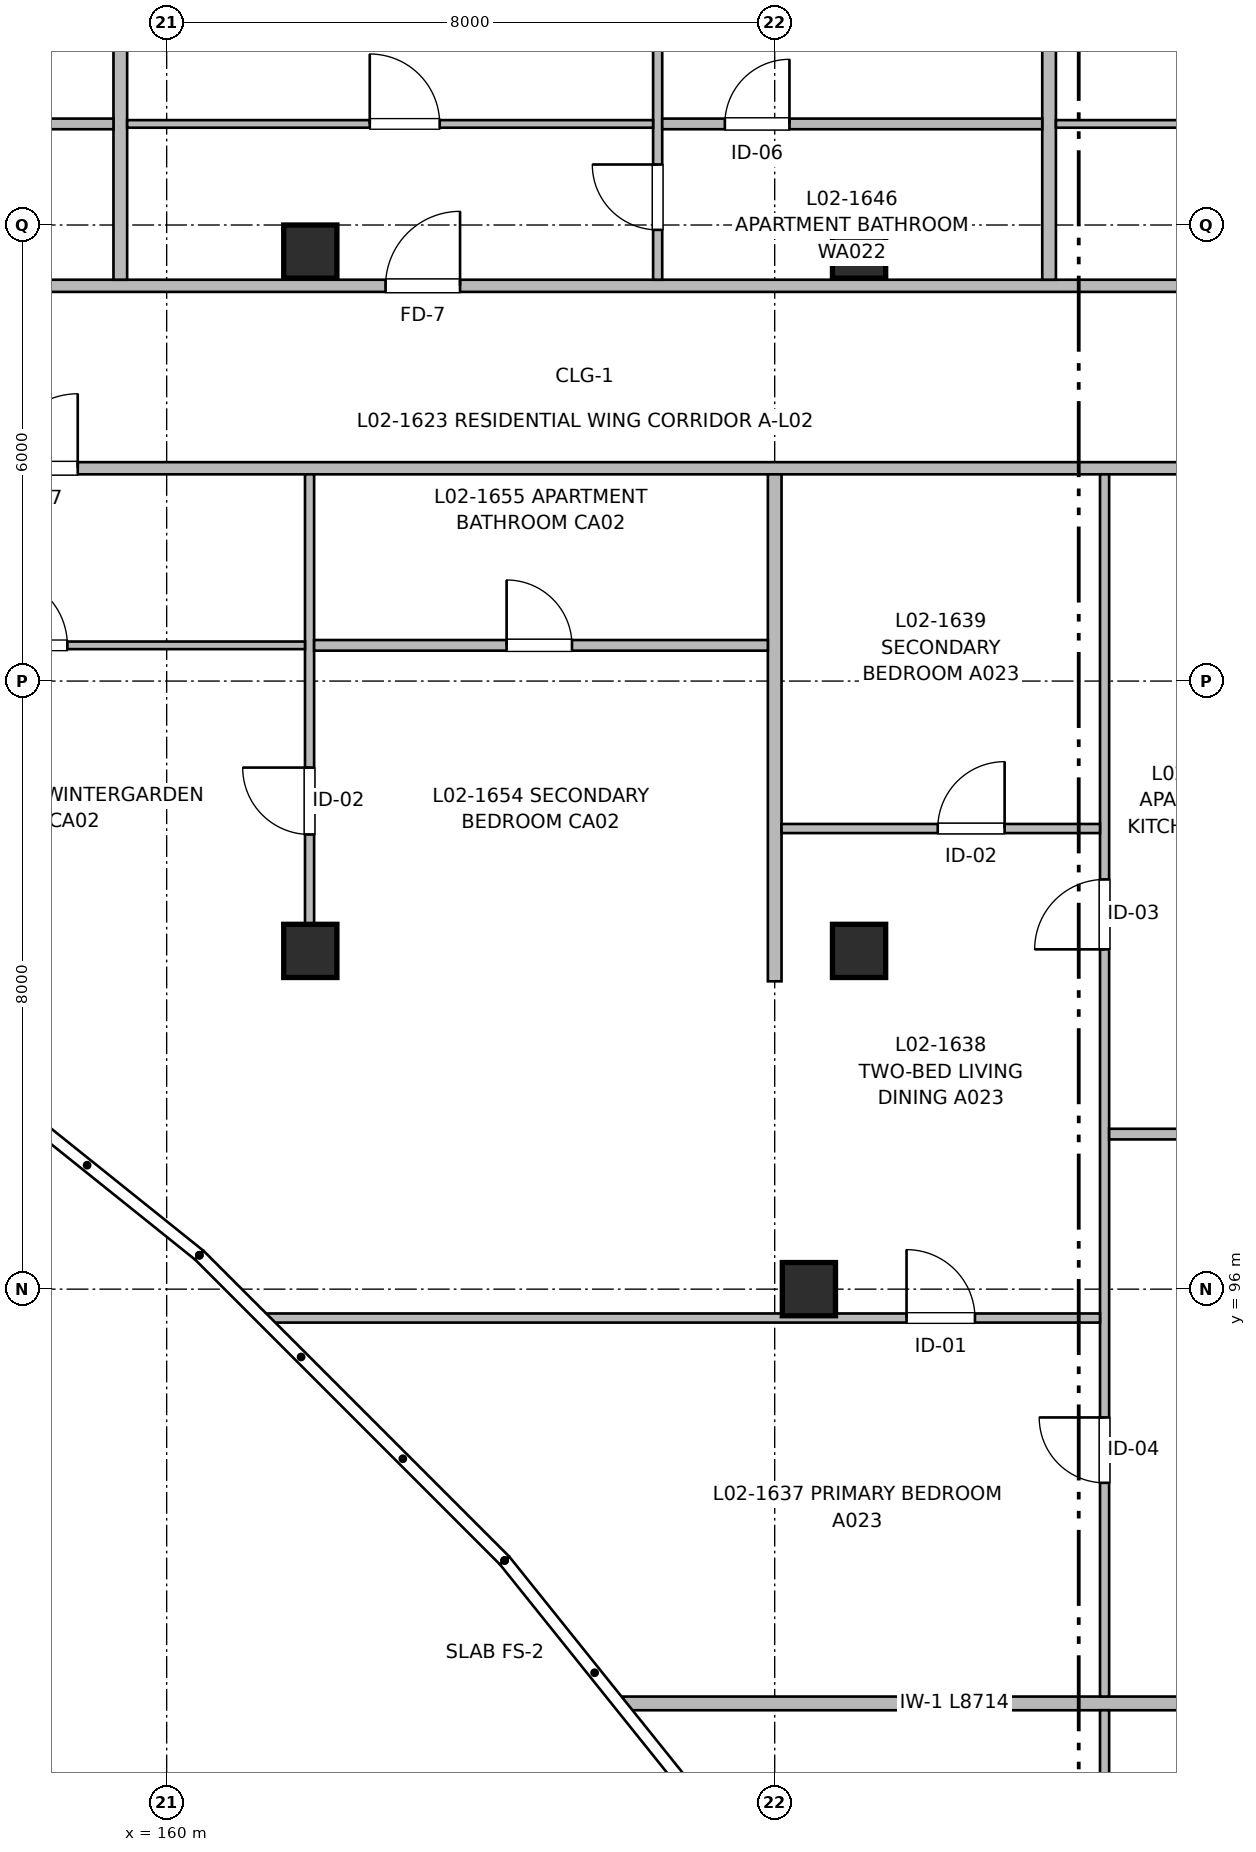
"""IFC4 building model, lengths in metres.
Left out: names, types, materials, properties, quantities, classifications, styles, units other than length and angle.
Written with IfcOpenShell. Run it as: python <this file> out.ifc"""

import sys

from ifc_helpers import new_model, si_unit, direction, frame, frame_2d, origin, origin_2d, place, context, subcontext, project, spatial, rectangle, extrude, element, fill, save


model = new_model("IFC4")
c1 = context("Model", 3, precision=1e-05, world=origin(), true_north=direction((0.0, 1.0)))
c2 = subcontext(c1, "Body", "Model", "MODEL_VIEW")
j1 = project(units=[si_unit("LENGTHUNIT", "METRE"), si_unit("PLANEANGLEUNIT", "RADIAN")], contexts=[c1])
p1 = place(None, origin())
s1 = spatial("IfcSite", under=j1, at=p1, CompositionType="ELEMENT")
p2 = place(p1, origin())
s2 = spatial("IfcBuilding", under=s1, at=p2, CompositionType="ELEMENT")
p3 = place(p2, frame((0.0, 0.0, 7.36)))
s3 = spatial("IfcBuildingStorey", under=s2, at=p3, CompositionType="ELEMENT", Elevation=7.36)
for number, where, z_axis, x_axis in (
    (1, (161.89, 100.45, 0.0), (0.0, 0.0, 1.0), (1.0, 0.0, 0.0)),
    (2, (161.89, 109.65, 0.0), (0.0, 0.0, 1.0), (1.0, 0.0, 0.0)),
    (3, (168.45, 96.0, 0.0), (0.0, 0.0, 1.0), (1.0, 0.0, 0.0)),
    (4, (169.11, 100.45, 0.0), (0.0, 0.0, 1.0), (1.0, 0.0, 0.0)),
    (5, (169.11, 109.65, 0.0), (0.0, 0.0, 1.0), (1.0, 0.0, 0.0)),
):
    element("IfcColumn", number, at=place(p3, frame(where, z_axis=z_axis, x_axis=x_axis)), inside=s3, PredefinedType="COLUMN", context=c2, shape_type="SweptSolid", body=[
        extrude(rectangle(XDim=0.7, YDim=0.7, at=origin_2d()), origin(), (0.0, 0.0, 1.0), 3.2),
    ])
p4 = place(p3, frame((147.18, 106.8, 0.0), z_axis=(0.0, 0.0, 1.0), x_axis=(1.0, 0.0, 0.0)))
e6 = element("IfcWall", 6, at=p4, inside=s3, PredefinedType="PARTITIONING", context=c2, shape_type="SweptSolid", body=[
    extrude(rectangle(XDim=27.62, YDim=0.16, at=frame_2d((13.81, 0.0))), origin(), (0.0, 0.0, 1.0), 2.935),
])
p5 = place(p4, frame((3.495, 0.0, 0.0)))
e7 = element("IfcOpeningElement", 7, at=p5, cuts=e6, PredefinedType="OPENING", context=c2, shape_type="SweptSolid", body=[
    extrude(rectangle(XDim=1.05, YDim=2.15, at=frame_2d((0.525, 1.075))), frame((0.0, 0.09, 0.0), z_axis=(0.0, -1.0, 0.0), x_axis=(1.0, 0.0, 0.0)), (0.0, 0.0, 1.0), 0.18),
])
p6 = place(p4, frame((10.67, 0.0, 0.0)))
e8 = element("IfcOpeningElement", 8, at=p6, cuts=e6, PredefinedType="OPENING", context=c2, shape_type="SweptSolid", body=[
    extrude(rectangle(XDim=0.98, YDim=2.15, at=frame_2d((0.49, 1.075))), frame((0.0, 0.09, 0.0), z_axis=(0.0, -1.0, 0.0), x_axis=(1.0, 0.0, 0.0)), (0.0, 0.0, 1.0), 0.18),
])
p7 = place(p3, frame((147.18, 109.2, 0.0), z_axis=(0.0, 0.0, 1.0), x_axis=(1.0, 0.0, 0.0)))
e9 = element("IfcWall", 9, at=p7, inside=s3, PredefinedType="PARTITIONING", context=c2, shape_type="SweptSolid", body=[
    extrude(rectangle(XDim=36.64, YDim=0.16, at=frame_2d((18.32, 0.0))), origin(), (0.0, 0.0, 1.0), 2.935),
])
p8 = place(p7, frame((3.025, 0.0, 0.0)))
e10 = element("IfcOpeningElement", 10, at=p8, cuts=e9, PredefinedType="OPENING", context=c2, shape_type="SweptSolid", body=[
    extrude(rectangle(XDim=0.98, YDim=2.15, at=frame_2d((0.49, 1.075))), frame((0.0, 0.09, 0.0), z_axis=(0.0, -1.0, 0.0), x_axis=(1.0, 0.0, 0.0)), (0.0, 0.0, 1.0), 0.18),
])
p9 = place(p7, frame((15.7, 0.0, 0.0)))
e11 = element("IfcOpeningElement", 11, at=p9, cuts=e9, PredefinedType="OPENING", context=c2, shape_type="SweptSolid", body=[
    extrude(rectangle(XDim=0.98, YDim=2.15, at=frame_2d((0.49, 1.075))), frame((0.0, 0.09, 0.0), z_axis=(0.0, -1.0, 0.0), x_axis=(1.0, 0.0, 0.0)), (0.0, 0.0, 1.0), 0.18),
])
p10 = place(p7, frame((27.145, 0.0, 0.0)))
e12 = element("IfcOpeningElement", 12, at=p10, cuts=e9, PredefinedType="OPENING", context=c2, shape_type="SweptSolid", body=[
    extrude(rectangle(XDim=0.98, YDim=2.15, at=frame_2d((0.49, 1.075))), frame((0.0, 0.09, 0.0), z_axis=(0.0, -1.0, 0.0), x_axis=(1.0, 0.0, 0.0)), (0.0, 0.0, 1.0), 0.18),
])
p11 = place(p3, frame((168.0, 100.05, 0.0), z_axis=(0.0, 0.0, 1.0), x_axis=(0.0, 1.0, 0.0)))
e13 = element("IfcWall", 13, at=p11, inside=s3, PredefinedType="PARTITIONING", context=c2, shape_type="SweptSolid", body=[
    extrude(rectangle(XDim=6.67, YDim=0.18, at=frame_2d((3.335, 0.0))), origin(), (0.0, 0.0, 1.0), 2.935),
])
p12 = place(p3, frame((166.006, 90.55, 0.0), z_axis=(0.0, 0.0, 1.0), x_axis=(1.0, 0.0, 0.0)))
e14 = element("IfcWall", 14, at=p12, inside=s3, PredefinedType="PARTITIONING", context=c2, shape_type="SweptSolid", body=[
    extrude(rectangle(XDim=8.714, YDim=0.18, at=frame_2d((4.357, 0.0))), origin(), (0.0, 0.0, 1.0), 2.935),
])
p13 = place(p3, frame((172.34, 73.45, 0.0), z_axis=(0.0, 0.0, 1.0), x_axis=(0.0, 1.0, 0.0)))
e15 = element("IfcWall", 15, at=p13, inside=s3, PredefinedType="PARTITIONING", context=c2, shape_type="SweptSolid", body=[
    extrude(rectangle(XDim=17.01, YDim=0.12, at=frame_2d((8.505, 0.0))), origin(), (0.0, 0.0, 1.0), 2.935),
])
p14 = place(p13, frame((2.972, 0.0, 0.0)))
e16 = element("IfcOpeningElement", 16, at=p14, cuts=e15, PredefinedType="OPENING", context=c2, shape_type="SweptSolid", body=[
    extrude(rectangle(XDim=0.86, YDim=2.1, at=frame_2d((0.43, 1.05))), frame((0.0, 0.07, 0.0), z_axis=(0.0, -1.0, 0.0), x_axis=(1.0, 0.0, 0.0)), (0.0, 0.0, 1.0), 0.14),
])
p15 = place(p13, frame((10.393, 0.0, 0.0)))
e17 = element("IfcOpeningElement", 17, at=p15, cuts=e15, PredefinedType="OPENING", context=c2, shape_type="SweptSolid", body=[
    extrude(rectangle(XDim=0.92, YDim=2.1, at=frame_2d((0.46, 1.05))), frame((0.0, 0.07, 0.0), z_axis=(0.0, -1.0, 0.0), x_axis=(1.0, 0.0, 0.0)), (0.0, 0.0, 1.0), 0.14),
])
p16 = place(p3, frame((172.34, 90.64, 0.0), z_axis=(0.0, 0.0, 1.0), x_axis=(0.0, 1.0, 0.0)))
e18 = element("IfcWall", 18, at=p16, inside=s3, PredefinedType="PARTITIONING", context=c2, shape_type="SweptSolid", body=[
    extrude(rectangle(XDim=16.08, YDim=0.12, at=frame_2d((8.04, 0.0))), origin(), (0.0, 0.0, 1.0), 2.935),
])
p17 = place(p16, frame((2.812, 0.0, 0.0)))
e19 = element("IfcOpeningElement", 19, at=p17, cuts=e18, PredefinedType="OPENING", context=c2, shape_type="SweptSolid", body=[
    extrude(rectangle(XDim=0.86, YDim=2.1, at=frame_2d((0.43, 1.05))), frame((0.0, 0.07, 0.0), z_axis=(0.0, -1.0, 0.0), x_axis=(1.0, 0.0, 0.0)), (0.0, 0.0, 1.0), 0.14),
])
p18 = place(p16, frame((9.83, 0.0, 0.0)))
e20 = element("IfcOpeningElement", 20, at=p18, cuts=e18, PredefinedType="OPENING", context=c2, shape_type="SweptSolid", body=[
    extrude(rectangle(XDim=0.92, YDim=2.1, at=frame_2d((0.46, 1.05))), frame((0.0, 0.07, 0.0), z_axis=(0.0, -1.0, 0.0), x_axis=(1.0, 0.0, 0.0)), (0.0, 0.0, 1.0), 0.14),
])
p19 = place(p3, frame((172.4, 98.04, 0.0), z_axis=(0.0, 0.0, 1.0), x_axis=(1.0, 0.0, 0.0)))
e21 = element("IfcWall", 21, at=p19, inside=s3, PredefinedType="PARTITIONING", context=c2, shape_type="SweptSolid", body=[
    extrude(rectangle(XDim=2.32, YDim=0.14, at=frame_2d((1.16, 0.0))), origin(), (0.0, 0.0, 1.0), 2.935),
])
p20 = place(p3, frame((161.312, 95.62, 0.0), z_axis=(0.0, 0.0, 1.0), x_axis=(1.0, 0.0, 0.0)))
e22 = element("IfcWall", 22, at=p20, inside=s3, PredefinedType="PARTITIONING", context=c2, shape_type="SweptSolid", body=[
    extrude(rectangle(XDim=10.968, YDim=0.12, at=frame_2d((5.484, 0.0))), origin(), (0.0, 0.0, 1.0), 2.935),
])
p21 = place(p20, frame((8.422, 0.0, 0.0)))
e23 = element("IfcOpeningElement", 23, at=p21, cuts=e22, PredefinedType="OPENING", context=c2, shape_type="SweptSolid", body=[
    extrude(rectangle(XDim=0.9, YDim=2.1, at=frame_2d((0.45, 1.05))), frame((0.0, 0.07, 0.0), z_axis=(0.0, -1.0, 0.0), x_axis=(1.0, 0.0, 0.0)), (0.0, 0.0, 1.0), 0.14),
])
p22 = place(p3, frame((168.09, 102.06, 0.0), z_axis=(0.0, 0.0, 1.0), x_axis=(1.0, 0.0, 0.0)))
e24 = element("IfcWall", 24, at=p22, inside=s3, PredefinedType="PARTITIONING", context=c2, shape_type="SweptSolid", body=[
    extrude(rectangle(XDim=4.19, YDim=0.12, at=frame_2d((2.095, 0.0))), origin(), (0.0, 0.0, 1.0), 2.935),
])
p23 = place(p22, frame((2.055, 0.0, 0.0)))
e25 = element("IfcOpeningElement", 25, at=p23, cuts=e24, PredefinedType="OPENING", context=c2, shape_type="SweptSolid", body=[
    extrude(rectangle(XDim=0.88, YDim=2.1, at=frame_2d((0.44, 1.05))), frame((0.0, 0.07, 0.0), z_axis=(0.0, -1.0, 0.0), x_axis=(1.0, 0.0, 0.0)), (0.0, 0.0, 1.0), 0.14),
])
for number, where, z_axis, x_axis in (
    (26, (159.39, 109.28, 0.0), (0.0, 0.0, 1.0), (0.0, 1.0, 0.0)),
    (27, (171.61, 109.28, 0.0), (0.0, 0.0, 1.0), (0.0, 1.0, 0.0)),
):
    element("IfcWall", number, at=place(p3, frame(where, z_axis=z_axis, x_axis=x_axis)), inside=s3, PredefinedType="PARTITIONING", context=c2, shape_type="SweptSolid", body=[
        extrude(rectangle(XDim=6.6, YDim=0.18, at=frame_2d((3.3, 0.0))), origin(), (0.0, 0.0, 1.0), 2.935),
    ])
p24 = place(p3, frame((154.27, 111.33, 0.0), z_axis=(0.0, 0.0, 1.0), x_axis=(1.0, 0.0, 0.0)))
e28 = element("IfcWall", 28, at=p24, inside=s3, PredefinedType="PARTITIONING", context=c2, shape_type="SweptSolid", body=[
    extrude(rectangle(XDim=5.03, YDim=0.14, at=frame_2d((2.515, 0.0))), origin(), (0.0, 0.0, 1.0), 2.935),
])
p25 = place(p24, frame((2.036, 0.0, 0.0)))
e29 = element("IfcOpeningElement", 29, at=p25, cuts=e28, PredefinedType="OPENING", context=c2, shape_type="SweptSolid", body=[
    extrude(rectangle(XDim=0.85, YDim=2.05, at=frame_2d((0.425, 1.025))), frame((0.0, 0.08, 0.0), z_axis=(0.0, -1.0, 0.0), x_axis=(1.0, 0.0, 0.0)), (0.0, 0.0, 1.0), 0.16),
])
p26 = place(p3, frame((166.46, 109.28, 0.0), z_axis=(0.0, 0.0, 1.0), x_axis=(0.0, 1.0, 0.0)))
e30 = element("IfcWall", 30, at=p26, inside=s3, PredefinedType="PARTITIONING", context=c2, shape_type="SweptSolid", body=[
    extrude(rectangle(XDim=6.6, YDim=0.12, at=frame_2d((3.3, 0.0))), origin(), (0.0, 0.0, 1.0), 2.935),
])
p27 = place(p26, frame((0.656, 0.0, 0.0)))
e31 = element("IfcOpeningElement", 31, at=p27, cuts=e30, PredefinedType="OPENING", context=c2, shape_type="SweptSolid", body=[
    extrude(rectangle(XDim=0.86, YDim=2.1, at=frame_2d((0.43, 1.05))), frame((0.0, 0.07, 0.0), z_axis=(0.0, -1.0, 0.0), x_axis=(1.0, 0.0, 0.0)), (0.0, 0.0, 1.0), 0.14),
])
p28 = place(p26, frame((4.097, 0.0, 0.0)))
e32 = element("IfcOpeningElement", 32, at=p28, cuts=e30, PredefinedType="OPENING", context=c2, shape_type="SweptSolid", body=[
    extrude(rectangle(XDim=0.9, YDim=2.1, at=frame_2d((0.45, 1.05))), frame((0.0, 0.07, 0.0), z_axis=(0.0, -1.0, 0.0), x_axis=(1.0, 0.0, 0.0)), (0.0, 0.0, 1.0), 0.14),
])
p29 = place(p3, frame((166.52, 111.33, 0.0), z_axis=(0.0, 0.0, 1.0), x_axis=(1.0, 0.0, 0.0)))
e33 = element("IfcWall", 33, at=p29, inside=s3, PredefinedType="PARTITIONING", context=c2, shape_type="SweptSolid", body=[
    extrude(rectangle(XDim=5.0, YDim=0.14, at=frame_2d((2.5, 0.0))), origin(), (0.0, 0.0, 1.0), 2.935),
])
p30 = place(p29, frame((0.824, 0.0, 0.0)))
e34 = element("IfcOpeningElement", 34, at=p30, cuts=e33, PredefinedType="OPENING", context=c2, shape_type="SweptSolid", body=[
    extrude(rectangle(XDim=0.85, YDim=2.05, at=frame_2d((0.425, 1.025))), frame((0.0, 0.08, 0.0), z_axis=(0.0, -1.0, 0.0), x_axis=(1.0, 0.0, 0.0)), (0.0, 0.0, 1.0), 0.16),
])
p31 = place(p3, frame((159.48, 111.33, 0.0), z_axis=(0.0, 0.0, 1.0), x_axis=(1.0, 0.0, 0.0)))
e35 = element("IfcWall", 35, at=p31, inside=s3, PredefinedType="PARTITIONING", context=c2, shape_type="SweptSolid", body=[
    extrude(rectangle(XDim=6.92, YDim=0.1, at=frame_2d((3.46, 0.0))), origin(), (0.0, 0.0, 1.0), 2.935),
])
p32 = place(p31, frame((3.192, 0.0, 0.0)))
e36 = element("IfcOpeningElement", 36, at=p32, cuts=e35, PredefinedType="OPENING", context=c2, shape_type="SweptSolid", body=[
    extrude(rectangle(XDim=0.92, YDim=2.1, at=frame_2d((0.46, 1.05))), frame((0.0, 0.06, 0.0), z_axis=(0.0, -1.0, 0.0), x_axis=(1.0, 0.0, 0.0)), (0.0, 0.0, 1.0), 0.12),
])
p33 = place(p3, frame((171.7, 111.33, 0.0), z_axis=(0.0, 0.0, 1.0), x_axis=(1.0, 0.0, 0.0)))
e37 = element("IfcWall", 37, at=p33, inside=s3, PredefinedType="PARTITIONING", context=c2, shape_type="SweptSolid", body=[
    extrude(rectangle(XDim=6.97, YDim=0.1, at=frame_2d((3.485, 0.0))), origin(), (0.0, 0.0, 1.0), 2.935),
])
p34 = place(p33, frame((2.812, 0.0, 0.0)))
e38 = element("IfcOpeningElement", 38, at=p34, cuts=e37, PredefinedType="OPENING", context=c2, shape_type="SweptSolid", body=[
    extrude(rectangle(XDim=0.92, YDim=2.1, at=frame_2d((0.46, 1.05))), frame((0.0, 0.06, 0.0), z_axis=(0.0, -1.0, 0.0), x_axis=(1.0, 0.0, 0.0)), (0.0, 0.0, 1.0), 0.12),
])
p35 = place(p3, frame((161.88, 100.18, 0.0), z_axis=(0.0, 0.0, 1.0), x_axis=(0.0, 1.0, 0.0)))
e39 = element("IfcWall", 39, at=p35, inside=s3, PredefinedType="PARTITIONING", context=c2, shape_type="SweptSolid", body=[
    extrude(rectangle(XDim=6.54, YDim=0.12, at=frame_2d((3.27, 0.0))), origin(), (0.0, 0.0, 1.0), 2.68),
])
p36 = place(p35, frame((1.802, 0.0, 0.0)))
e40 = element("IfcOpeningElement", 40, at=p36, cuts=e39, PredefinedType="OPENING", context=c2, shape_type="SweptSolid", body=[
    extrude(rectangle(XDim=0.88, YDim=2.1, at=frame_2d((0.44, 1.05))), frame((0.0, 0.07, 0.0), z_axis=(0.0, -1.0, 0.0), x_axis=(1.0, 0.0, 0.0)), (0.0, 0.0, 1.0), 0.14),
])
p37 = place(p3, frame((161.94, 104.47, 0.0), z_axis=(0.0, 0.0, 1.0), x_axis=(1.0, 0.0, 0.0)))
e41 = element("IfcWall", 41, at=p37, inside=s3, PredefinedType="PARTITIONING", context=c2, shape_type="SweptSolid", body=[
    extrude(rectangle(XDim=5.97, YDim=0.14, at=frame_2d((2.985, 0.0))), origin(), (0.0, 0.0, 1.0), 2.935),
])
p38 = place(p37, frame((2.533, 0.0, 0.0)))
e42 = element("IfcOpeningElement", 42, at=p38, cuts=e41, PredefinedType="OPENING", context=c2, shape_type="SweptSolid", body=[
    extrude(rectangle(XDim=0.86, YDim=2.1, at=frame_2d((0.43, 1.05))), frame((0.0, 0.08, 0.0), z_axis=(0.0, -1.0, 0.0), x_axis=(1.0, 0.0, 0.0)), (0.0, 0.0, 1.0), 0.16),
])
p39 = place(p3, frame((154.8, 104.47, 0.0), z_axis=(0.0, 0.0, 1.0), x_axis=(1.0, 0.0, 0.0)))
e43 = element("IfcWall", 43, at=p39, inside=s3, PredefinedType="PARTITIONING", context=c2, shape_type="SweptSolid", body=[
    extrude(rectangle(XDim=7.02, YDim=0.1, at=frame_2d((3.51, 0.0))), origin(), (0.0, 0.0, 1.0), 2.935),
])
p40 = place(p39, frame((2.974, 0.0, 0.0)))
e44 = element("IfcOpeningElement", 44, at=p40, cuts=e43, PredefinedType="OPENING", context=c2, shape_type="SweptSolid", body=[
    extrude(rectangle(XDim=0.92, YDim=2.1, at=frame_2d((0.46, 1.05))), frame((0.0, 0.06, 0.0), z_axis=(0.0, -1.0, 0.0), x_axis=(1.0, 0.0, 0.0)), (0.0, 0.0, 1.0), 0.12),
])
p41 = place(p17, origin())
e45 = element("IfcDoor", 45, at=p41, inside=s3, OperationType="SINGLE_SWING_RIGHT", PredefinedType="DOOR", context=c2, shape_type="SweptSolid", body=[
    extrude(rectangle(XDim=0.86, YDim=2.1, at=frame_2d((0.43, 1.05))), frame((0.0, 0.025, 0.0), z_axis=(0.0, -1.0, 0.0), x_axis=(1.0, 0.0, 0.0)), (0.0, 0.0, 1.0), 0.05),
])
fill(e19, e45)
p42 = place(p18, origin())
e46 = element("IfcDoor", 46, at=p42, inside=s3, OperationType="SINGLE_SWING_LEFT", PredefinedType="DOOR", context=c2, shape_type="SweptSolid", body=[
    extrude(rectangle(XDim=0.92, YDim=2.1, at=frame_2d((0.46, 1.05))), frame((0.0, 0.025, 0.0), z_axis=(0.0, -1.0, 0.0), x_axis=(1.0, 0.0, 0.0)), (0.0, 0.0, 1.0), 0.05),
])
fill(e20, e46)
p43 = place(p21, origin())
e47 = element("IfcDoor", 47, at=p43, inside=s3, OperationType="SINGLE_SWING_LEFT", PredefinedType="DOOR", context=c2, shape_type="SweptSolid", body=[
    extrude(rectangle(XDim=0.9, YDim=2.1, at=frame_2d((0.45, 1.05))), frame((0.0, 0.025, 0.0), z_axis=(0.0, -1.0, 0.0), x_axis=(1.0, 0.0, 0.0)), (0.0, 0.0, 1.0), 0.05),
])
fill(e23, e47)
p44 = place(p23, origin())
e48 = element("IfcDoor", 48, at=p44, inside=s3, OperationType="SINGLE_SWING_RIGHT", PredefinedType="DOOR", context=c2, shape_type="SweptSolid", body=[
    extrude(rectangle(XDim=0.88, YDim=2.1, at=frame_2d((0.44, 1.05))), frame((0.0, 0.025, 0.0), z_axis=(0.0, -1.0, 0.0), x_axis=(1.0, 0.0, 0.0)), (0.0, 0.0, 1.0), 0.05),
])
fill(e25, e48)
p45 = place(p9, origin())
e49 = element("IfcDoor", 49, at=p45, inside=s3, OperationType="SINGLE_SWING_RIGHT", PredefinedType="DOOR", context=c2, shape_type="SweptSolid", body=[
    extrude(rectangle(XDim=0.98, YDim=2.15, at=frame_2d((0.49, 1.075))), frame((0.0, 0.025, 0.0), z_axis=(0.0, -1.0, 0.0), x_axis=(1.0, 0.0, 0.0)), (0.0, 0.0, 1.0), 0.05),
])
fill(e11, e49)
p46 = place(p32, origin())
e50 = element("IfcDoor", 50, at=p46, inside=s3, OperationType="SINGLE_SWING_LEFT", PredefinedType="DOOR", context=c2, shape_type="SweptSolid", body=[
    extrude(rectangle(XDim=0.92, YDim=2.1, at=frame_2d((0.46, 1.05))), frame((0.0, 0.025, 0.0), z_axis=(0.0, -1.0, 0.0), x_axis=(1.0, 0.0, 0.0)), (0.0, 0.0, 1.0), 0.05),
])
fill(e36, e50)
p47 = place(p27, origin())
e51 = element("IfcDoor", 51, at=p47, inside=s3, OperationType="SINGLE_SWING_RIGHT", PredefinedType="DOOR", context=c2, shape_type="SweptSolid", body=[
    extrude(rectangle(XDim=0.86, YDim=2.1, at=frame_2d((0.43, 1.05))), frame((0.0, 0.025, 0.0), z_axis=(0.0, -1.0, 0.0), x_axis=(1.0, 0.0, 0.0)), (0.0, 0.0, 1.0), 0.05),
])
fill(e31, e51)
p48 = place(p30, origin())
e52 = element("IfcDoor", 52, at=p48, inside=s3, OperationType="SINGLE_SWING_RIGHT", PredefinedType="DOOR", context=c2, shape_type="SweptSolid", body=[
    extrude(rectangle(XDim=0.85, YDim=2.05, at=frame_2d((0.425, 1.025))), frame((0.0, 0.025, 0.0), z_axis=(0.0, -1.0, 0.0), x_axis=(1.0, 0.0, 0.0)), (0.0, 0.0, 1.0), 0.05),
])
fill(e34, e52)
p49 = place(p6, origin())
e53 = element("IfcDoor", 53, at=p49, inside=s3, OperationType="SINGLE_SWING_RIGHT", PredefinedType="DOOR", context=c2, shape_type="SweptSolid", body=[
    extrude(rectangle(XDim=0.98, YDim=2.15, at=frame_2d((0.49, 1.075))), frame((0.0, 0.025, 0.0), z_axis=(0.0, -1.0, 0.0), x_axis=(1.0, 0.0, 0.0)), (0.0, 0.0, 1.0), 0.05),
])
fill(e8, e53)
p50 = place(p40, origin())
e54 = element("IfcDoor", 54, at=p50, inside=s3, OperationType="SINGLE_SWING_LEFT", PredefinedType="DOOR", context=c2, shape_type="SweptSolid", body=[
    extrude(rectangle(XDim=0.92, YDim=2.1, at=frame_2d((0.46, 1.05))), frame((0.0, 0.025, 0.0), z_axis=(0.0, -1.0, 0.0), x_axis=(1.0, 0.0, 0.0)), (0.0, 0.0, 1.0), 0.05),
])
fill(e44, e54)
p51 = place(p36, origin())
e55 = element("IfcDoor", 55, at=p51, inside=s3, OperationType="SINGLE_SWING_RIGHT", PredefinedType="DOOR", context=c2, shape_type="SweptSolid", body=[
    extrude(rectangle(XDim=0.88, YDim=2.1, at=frame_2d((0.44, 1.05))), frame((0.0, 0.025, 0.0), z_axis=(0.0, -1.0, 0.0), x_axis=(1.0, 0.0, 0.0)), (0.0, 0.0, 1.0), 0.05),
])
fill(e40, e55)
p52 = place(p38, origin())
e56 = element("IfcDoor", 56, at=p52, inside=s3, OperationType="SINGLE_SWING_LEFT", PredefinedType="DOOR", context=c2, shape_type="SweptSolid", body=[
    extrude(rectangle(XDim=0.86, YDim=2.1, at=frame_2d((0.43, 1.05))), frame((0.0, 0.025, 0.0), z_axis=(0.0, -1.0, 0.0), x_axis=(1.0, 0.0, 0.0)), (0.0, 0.0, 1.0), 0.05),
])
fill(e42, e56)
save(model, sys.argv[1])
